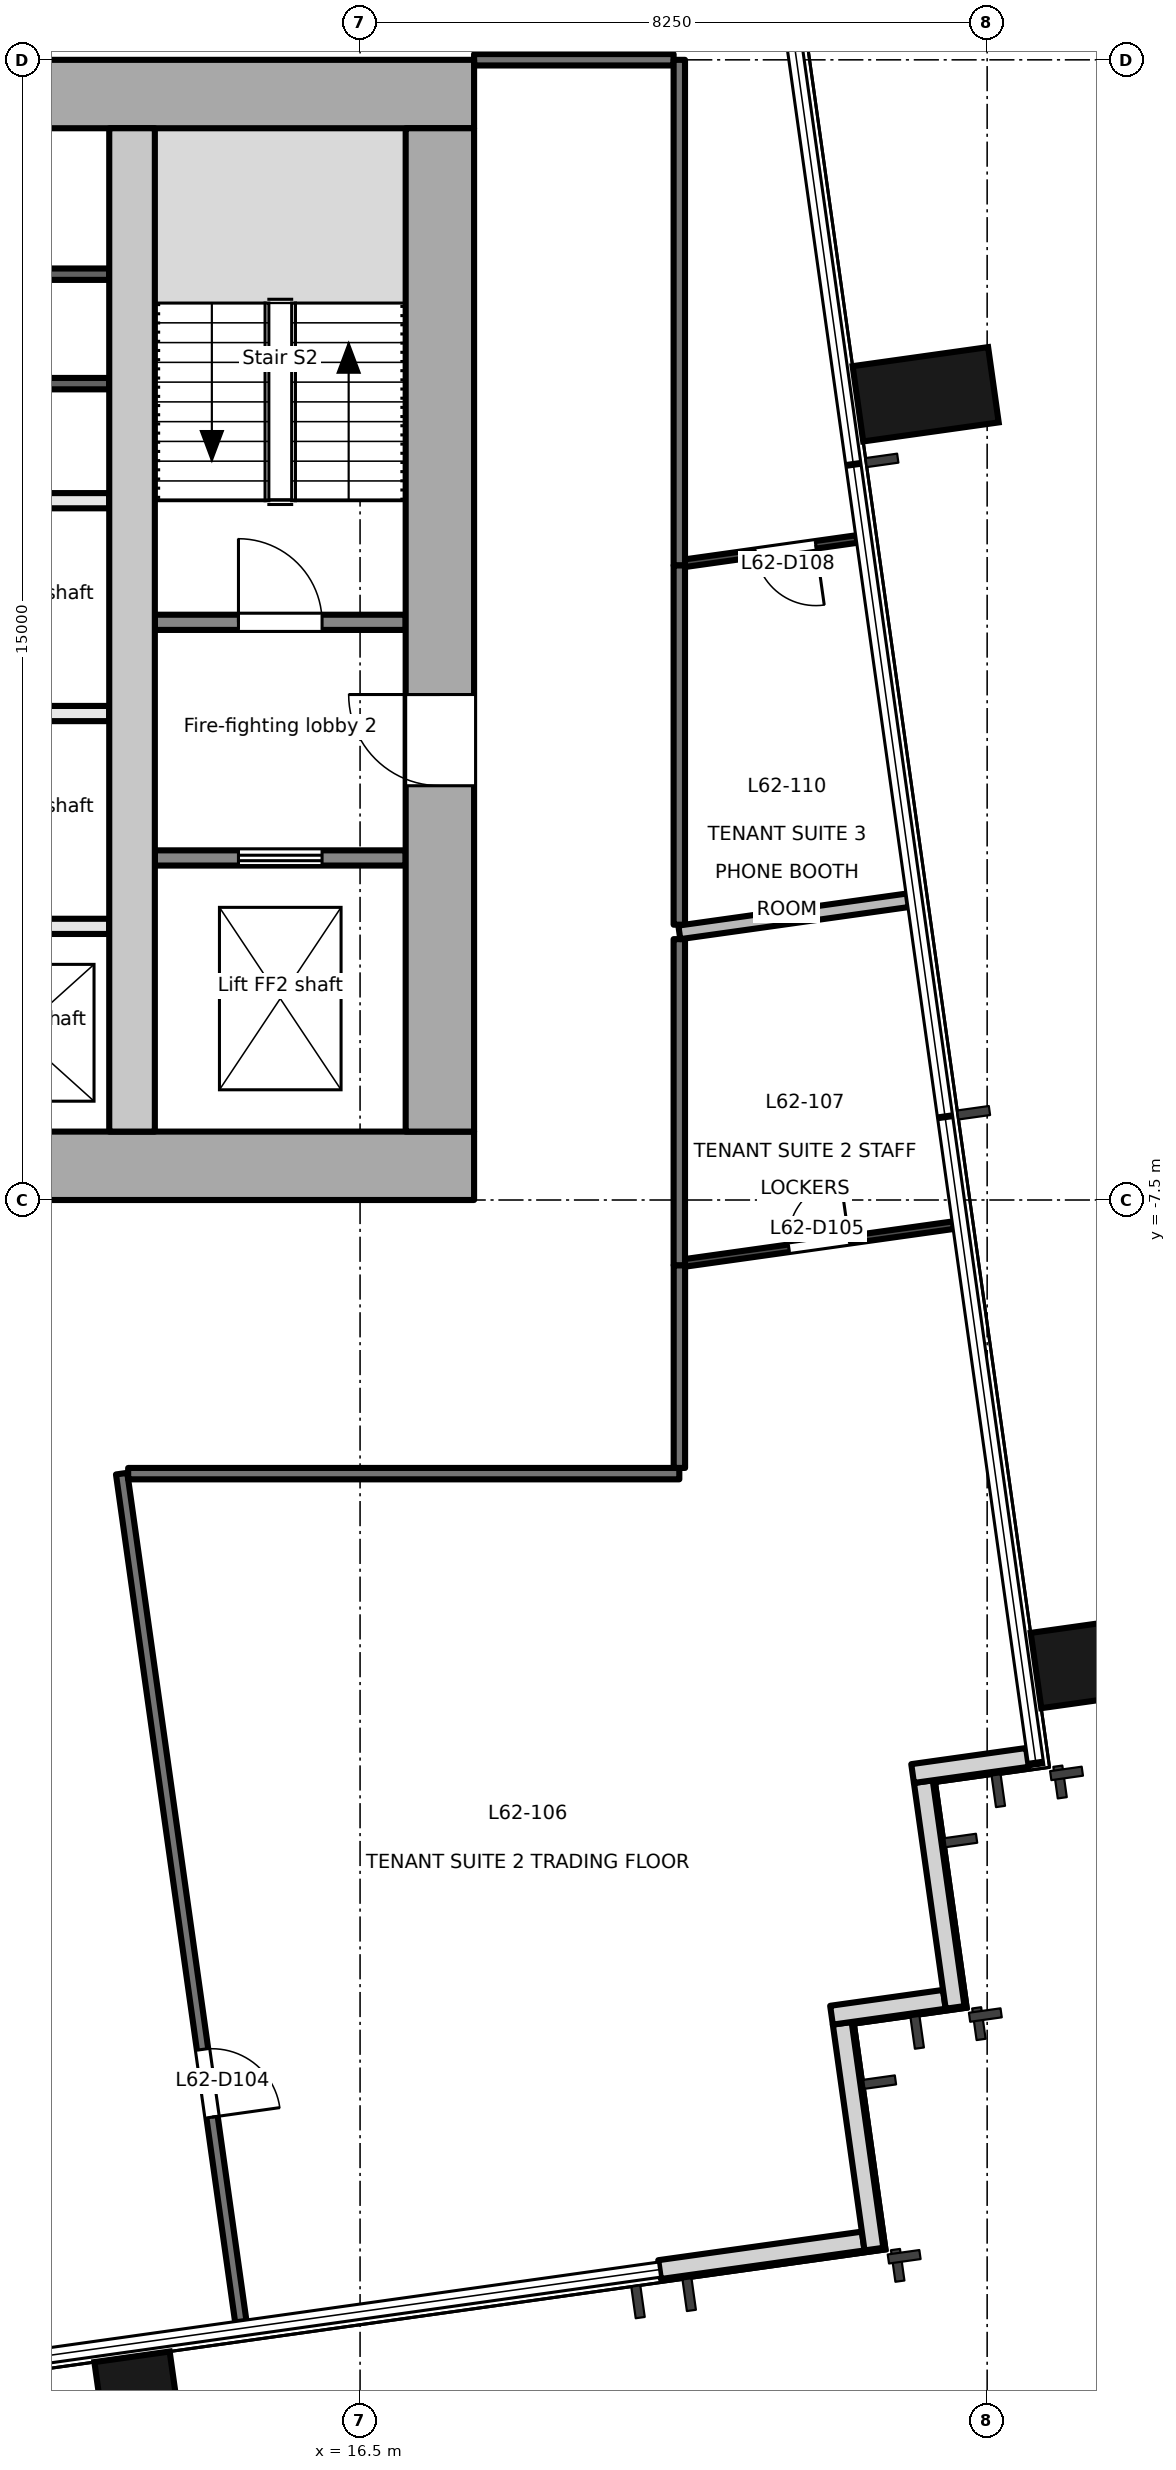
"""IFC4 building model, lengths in metres.
Left out: names, types, materials, properties, quantities, classifications, styles, units other than length and angle.
Written with IfcOpenShell. Run it as: python <this file> out.ifc"""

import sys

from ifc_helpers import new_model, si_unit, direction, frame, frame_2d, origin, origin_2d, place, context, subcontext, project, spatial, rectangle, extrude, element, fill, save


model = new_model("IFC4")
c1 = context("Model", 3, precision=1e-05, world=origin(), true_north=direction((0.0, 1.0)))
c2 = subcontext(c1, "Body", "Model", "MODEL_VIEW")
j1 = project(units=[si_unit("LENGTHUNIT", "METRE"), si_unit("PLANEANGLEUNIT", "RADIAN")], contexts=[c1])
p1 = place(None, origin())
s1 = spatial("IfcSite", under=j1, at=p1, CompositionType="ELEMENT")
p2 = place(p1, origin())
s2 = spatial("IfcBuilding", under=s1, at=p2, CompositionType="ELEMENT")
p3 = place(p2, frame((0.0, 0.0, 270.7)))
s3 = spatial("IfcBuildingStorey", under=s2, at=p3, CompositionType="ELEMENT", Elevation=270.7)
for number, where, z_axis, x_axis in (
    (1, (13.625, -23.61, -0.2), (0.0, 0.0, 1.0), (0.99, 0.139, 0.0)),
    (2, (26.284, -13.565, -0.2), (0.0, 0.0, 1.0), (-0.139, 0.99, 0.0)),
    (3, (23.941, 3.1, -0.2), (0.0, 0.0, 1.0), (-0.139, 0.99, 0.0)),
):
    element("IfcColumn", number, at=place(p3, frame(where, z_axis=z_axis, x_axis=x_axis)), inside=s3, PredefinedType="COLUMN", context=c2, shape_type="SweptSolid", body=[
        extrude(rectangle(XDim=1.0, YDim=1.8, at=origin_2d()), origin(), (0.0, 0.0, 1.0), 3.9),
    ])
p4 = place(p3, frame((20.44, -21.572, 0.0), z_axis=(0.0, 0.0, 1.0), x_axis=(0.990293105353, 0.138994839796, 0.0)))
e4 = element("IfcWall", 4, at=p4, inside=s3, PredefinedType="SOLIDWALL", context=c2, shape_type="SweptSolid", body=[
    extrude(rectangle(XDim=2.705, YDim=0.25, at=frame_2d((1.353, 0.0))), origin(), (0.0, 0.0, 1.0), 3.7),
])
p5 = place(p3, frame((23.26, -21.302, 0.0), z_axis=(0.0, 0.0, 1.0), x_axis=(-0.138994228812, 0.990293191109, 0.0)))
e5 = element("IfcWall", 5, at=p5, inside=s3, PredefinedType="SOLIDWALL", context=c2, shape_type="SweptSolid", body=[
    extrude(rectangle(XDim=3.0, YDim=0.25, at=frame_2d((1.5, 0.0))), origin(), (0.0, 0.0, 1.0), 3.7),
])
p6 = place(p3, frame((22.702, -18.225, 0.0), z_axis=(0.0, 0.0, 1.0), x_axis=(0.990243596651, 0.13934711799, 0.0)))
e6 = element("IfcWall", 6, at=p6, inside=s3, PredefinedType="SOLIDWALL", context=c2, shape_type="SweptSolid", body=[
    extrude(rectangle(XDim=1.5, YDim=0.25, at=frame_2d((0.75, 0.0))), origin(), (0.0, 0.0, 1.0), 3.7),
])
p7 = place(p3, frame((24.328, -18.122, 0.0), z_axis=(0.0, 0.0, 1.0), x_axis=(-0.139358350296, 0.990242015975, 0.0)))
e7 = element("IfcWall", 7, at=p7, inside=s3, PredefinedType="SOLIDWALL", context=c2, shape_type="SweptSolid", body=[
    extrude(rectangle(XDim=2.999, YDim=0.25, at=frame_2d((1.5, 0.0))), origin(), (0.0, 0.0, 1.0), 3.7),
])
p8 = place(p3, frame((23.769, -15.046, 0.0), z_axis=(0.0, 0.0, 1.0), x_axis=(0.990260716096, 0.139225407725, 0.0)))
e8 = element("IfcWall", 8, at=p8, inside=s3, PredefinedType="SOLIDWALL", context=c2, shape_type="SweptSolid", body=[
    extrude(rectangle(XDim=1.526, YDim=0.25, at=frame_2d((0.763, 0.0))), origin(), (0.0, 0.0, 1.0), 3.7),
])
p9 = place(p3, frame((-18.0, -7.05, -0.2), z_axis=(0.0, 0.0, 1.0), x_axis=(1.0, 0.0, 0.0)))
e9 = element("IfcWall", 9, at=p9, inside=s3, PredefinedType="SHEAR", context=c2, shape_type="SweptSolid", body=[
    extrude(rectangle(XDim=36.0, YDim=0.9, at=frame_2d((18.0, 0.0))), origin(), (0.0, 0.0, 1.0), 3.9),
])
p10 = place(p9, frame((11.3, 0.0, 0.2)))
e10 = element("IfcOpeningElement", 10, at=p10, cuts=e9, PredefinedType="OPENING", context=c2, shape_type="SweptSolid", body=[
    extrude(rectangle(XDim=1.8, YDim=2.1, at=frame_2d((0.9, 1.05))), frame((0.0, 0.46, 0.0), z_axis=(0.0, -1.0, 0.0), x_axis=(1.0, 0.0, 0.0)), (0.0, 0.0, 1.0), 0.921),
])
p11 = place(p9, frame((16.8, 0.0, 0.2)))
e11 = element("IfcOpeningElement", 11, at=p11, cuts=e9, PredefinedType="OPENING", context=c2, shape_type="SweptSolid", body=[
    extrude(rectangle(XDim=2.4, YDim=2.1, at=frame_2d((1.2, 1.05))), frame((0.0, 0.46, 0.0), z_axis=(0.0, -1.0, 0.0), x_axis=(1.0, 0.0, 0.0)), (0.0, 0.0, 1.0), 0.921),
])
p12 = place(p9, frame((26.1, 0.0, 0.2)))
e12 = element("IfcOpeningElement", 12, at=p12, cuts=e9, PredefinedType="OPENING", context=c2, shape_type="SweptSolid", body=[
    extrude(rectangle(XDim=2.4, YDim=2.1, at=frame_2d((1.2, 1.05))), frame((0.0, 0.46, 0.0), z_axis=(0.0, -1.0, 0.0), x_axis=(1.0, 0.0, 0.0)), (0.0, 0.0, 1.0), 0.921),
])
p13 = place(p3, frame((-18.0, 7.05, -0.2), z_axis=(0.0, 0.0, 1.0), x_axis=(1.0, 0.0, 0.0)))
e13 = element("IfcWall", 13, at=p13, inside=s3, PredefinedType="SHEAR", context=c2, shape_type="SweptSolid", body=[
    extrude(rectangle(XDim=36.0, YDim=0.9, at=frame_2d((18.0, 0.0))), origin(), (0.0, 0.0, 1.0), 3.9),
])
p14 = place(p3, frame((17.55, -6.6, -0.2), z_axis=(0.0, 0.0, 1.0), x_axis=(0.0, 1.0, 0.0)))
e14 = element("IfcWall", 14, at=p14, inside=s3, PredefinedType="SHEAR", context=c2, shape_type="SweptSolid", body=[
    extrude(rectangle(XDim=13.2, YDim=0.9, at=frame_2d((6.6, 0.0))), origin(), (0.0, 0.0, 1.0), 3.9),
])
p15 = place(p14, frame((4.55, 0.0, 0.2)))
e15 = element("IfcOpeningElement", 15, at=p15, cuts=e14, PredefinedType="OPENING", context=c2, shape_type="SweptSolid", body=[
    extrude(rectangle(XDim=1.2, YDim=2.1, at=frame_2d((0.6, 1.05))), frame((0.0, 0.46, 0.0), z_axis=(0.0, -1.0, 0.0), x_axis=(1.0, 0.0, 0.0)), (0.0, 0.0, 1.0), 0.921),
])
p16 = place(p3, frame((13.5, -6.6, -0.2), z_axis=(0.0, 0.0, 1.0), x_axis=(0.0, 1.0, 0.0)))
e16 = element("IfcWall", 16, at=p16, inside=s3, PredefinedType="SHEAR", context=c2, shape_type="SweptSolid", body=[
    extrude(rectangle(XDim=13.2, YDim=0.6, at=frame_2d((6.6, 0.0))), origin(), (0.0, 0.0, 1.0), 3.9),
])
p17 = place(p3, frame((13.8, -3.0, 0.0), z_axis=(0.0, 0.0, 1.0), x_axis=(1.0, 0.0, 0.0)))
e17 = element("IfcWall", 17, at=p17, inside=s3, PredefinedType="PARTITIONING", context=c2, shape_type="SweptSolid", body=[
    extrude(rectangle(XDim=3.3, YDim=0.2, at=frame_2d((1.65, 0.0))), origin(), (0.0, 0.0, 1.0), 3.7),
])
p18 = place(p17, frame((1.1, 0.0, 0.0)))
e18 = element("IfcOpeningElement", 18, at=p18, cuts=e17, PredefinedType="OPENING", context=c2, shape_type="SweptSolid", body=[
    extrude(rectangle(XDim=1.1, YDim=2.1, at=frame_2d((0.55, 1.05))), frame((0.0, 0.111, 0.0), z_axis=(0.0, -1.0, 0.0), x_axis=(1.0, 0.0, 0.0)), (0.0, 0.0, 1.0), 0.221),
])
p19 = place(p3, frame((13.8, 0.1, 0.0), z_axis=(0.0, 0.0, 1.0), x_axis=(1.0, 0.0, 0.0)))
e19 = element("IfcWall", 19, at=p19, inside=s3, PredefinedType="PARTITIONING", context=c2, shape_type="SweptSolid", body=[
    extrude(rectangle(XDim=3.3, YDim=0.2, at=frame_2d((1.65, 0.0))), origin(), (0.0, 0.0, 1.0), 3.7),
])
p20 = place(p19, frame((1.1, 0.0, 0.0)))
e20 = element("IfcOpeningElement", 20, at=p20, cuts=e19, PredefinedType="OPENING", context=c2, shape_type="SweptSolid", body=[
    extrude(rectangle(XDim=1.1, YDim=2.1, at=frame_2d((0.55, 1.05))), frame((0.0, 0.111, 0.0), z_axis=(0.0, -1.0, 0.0), x_axis=(1.0, 0.0, 0.0)), (0.0, 0.0, 1.0), 0.221),
])
for number, where, z_axis, x_axis in (
    (21, (10.9, -3.9, 0.0), (0.0, 0.0, 1.0), (1.0, 0.0, 0.0)),
    (22, (10.9, -1.1, 0.0), (0.0, 0.0, 1.0), (1.0, 0.0, 0.0)),
    (23, (10.9, 1.7, 0.0), (0.0, 0.0, 1.0), (1.0, 0.0, 0.0)),
):
    element("IfcWall", number, at=place(p3, frame(where, z_axis=z_axis, x_axis=x_axis)), inside=s3, PredefinedType="PARTITIONING", context=c2, shape_type="SweptSolid", body=[
        extrude(rectangle(XDim=2.3, YDim=0.2, at=frame_2d((1.15, 0.0))), origin(), (0.0, 0.0, 1.0), 3.7),
    ])
for number, where, z_axis, x_axis in (
    (24, (10.9, 3.24, 0.0), (0.0, 0.0, 1.0), (1.0, 0.0, 0.0)),
    (25, (10.9, 4.68, 0.0), (0.0, 0.0, 1.0), (1.0, 0.0, 0.0)),
):
    element("IfcWall", number, at=place(p3, frame(where, z_axis=z_axis, x_axis=x_axis)), inside=s3, PredefinedType="PARTITIONING", context=c2, shape_type="SweptSolid", body=[
        extrude(rectangle(XDim=2.3, YDim=0.15, at=frame_2d((1.15, 0.0))), origin(), (0.0, 0.0, 1.0), 3.7),
    ])
p21 = place(p3, frame((13.363, -11.1, 0.0), z_axis=(0.0, 0.0, 1.0), x_axis=(0.139172815303, -0.990268108888, 0.0)))
e26 = element("IfcWall", 26, at=p21, inside=s3, PredefinedType="PARTITIONING", context=c2, shape_type="SweptSolid", body=[
    extrude(rectangle(XDim=11.266, YDim=0.15, at=frame_2d((5.633, 0.0))), origin(), (0.0, 0.0, 1.0), 3.0),
])
p22 = place(p21, frame((7.649, 0.0, 0.0)))
e27 = element("IfcOpeningElement", 27, at=p22, cuts=e26, PredefinedType="OPENING", context=c2, shape_type="SweptSolid", body=[
    extrude(rectangle(XDim=0.9, YDim=2.1, at=frame_2d((0.45, 1.05))), frame((0.0, 0.085, 0.0), z_axis=(0.0, -1.0, 0.0), x_axis=(1.0, 0.0, 0.0)), (0.0, 0.0, 1.0), 0.171),
])
p23 = place(p3, frame((20.7, -11.1, 0.0), z_axis=(0.0, 0.0, 1.0), x_axis=(-1.0, 0.0, 0.0)))
e28 = element("IfcWall", 28, at=p23, inside=s3, PredefinedType="PARTITIONING", context=c2, shape_type="SweptSolid", body=[
    extrude(rectangle(XDim=7.251, YDim=0.15, at=frame_2d((3.625, 0.0))), origin(), (0.0, 0.0, 1.0), 3.0),
])
p24 = place(p3, frame((20.701, -8.358, 0.0), z_axis=(0.0, 0.0, 1.0), x_axis=(0.0, -1.0, 0.0)))
e29 = element("IfcWall", 29, at=p24, inside=s3, PredefinedType="PARTITIONING", context=c2, shape_type="SweptSolid", body=[
    extrude(rectangle(XDim=2.667, YDim=0.15, at=frame_2d((1.333, 0.0))), origin(), (0.0, 0.0, 1.0), 3.7),
])
p25 = place(p3, frame((20.7, -4.068, 0.0), z_axis=(0.0, 0.0, 1.0), x_axis=(0.0, -1.0, 0.0)))
e30 = element("IfcWall", 30, at=p25, inside=s3, PredefinedType="PARTITIONING", context=c2, shape_type="SweptSolid", body=[
    extrude(rectangle(XDim=4.29, YDim=0.15, at=frame_2d((2.145, 0.0))), origin(), (0.0, 0.0, 1.0), 3.4),
])
p26 = place(p3, frame((18.0, 7.501, 0.0), z_axis=(0.0, 0.0, 1.0), x_axis=(1.0, 0.0, 0.0)))
e31 = element("IfcWall", 31, at=p26, inside=s3, PredefinedType="PARTITIONING", context=c2, shape_type="SweptSolid", body=[
    extrude(rectangle(XDim=2.625, YDim=0.15, at=frame_2d((1.312, 0.0))), origin(), (0.0, 0.0, 1.0), 3.7),
])
p27 = place(p3, frame((20.7, 7.5, 0.0), z_axis=(0.0, 0.0, 1.0), x_axis=(0.0, -1.0, 0.0)))
e32 = element("IfcWall", 32, at=p27, inside=s3, PredefinedType="PARTITIONING", context=c2, shape_type="SweptSolid", body=[
    extrude(rectangle(XDim=6.652, YDim=0.15, at=frame_2d((3.326, 0.0))), origin(), (0.0, 0.0, 1.0), 3.4),
])
p28 = place(p3, frame((20.7, 0.848, 0.0), z_axis=(0.0, 0.0, 1.0), x_axis=(0.0, -1.0, 0.0)))
e33 = element("IfcWall", 33, at=p28, inside=s3, PredefinedType="PARTITIONING", context=c2, shape_type="SweptSolid", body=[
    extrude(rectangle(XDim=4.726, YDim=0.15, at=frame_2d((2.363, 0.0))), origin(), (0.0, 0.0, 1.0), 3.4),
])
p29 = place(p3, frame((20.768, -8.328, 0.0), z_axis=(0.0, 0.0, 1.0), x_axis=(0.990282917859, 0.139067403067, 0.0)))
e34 = element("IfcWall", 34, at=p29, inside=s3, PredefinedType="PARTITIONING", context=c2, shape_type="SweptSolid", body=[
    extrude(rectangle(XDim=3.573, YDim=0.1, at=frame_2d((1.786, 0.0))), origin(), (0.0, 0.0, 1.0), 3.7),
])
p30 = place(p29, frame((1.387, 0.0, 0.0)))
e35 = element("IfcOpeningElement", 35, at=p30, cuts=e34, PredefinedType="OPENING", context=c2, shape_type="SweptSolid", body=[
    extrude(rectangle(XDim=0.8, YDim=2.1, at=frame_2d((0.4, 1.05))), frame((0.0, 0.061, 0.0), z_axis=(0.0, -1.0, 0.0), x_axis=(1.0, 0.0, 0.0)), (0.0, 0.0, 1.0), 0.121),
])
p31 = place(p3, frame((20.7, -3.979, 0.0), z_axis=(0.0, 0.0, 1.0), x_axis=(0.990284458693, 0.139056430527, 0.0)))
e36 = element("IfcWall", 36, at=p31, inside=s3, PredefinedType="PARTITIONING", context=c2, shape_type="SweptSolid", body=[
    extrude(rectangle(XDim=3.036, YDim=0.18, at=frame_2d((1.518, 0.0))), origin(), (0.0, 0.0, 1.0), 3.7),
])
p32 = place(p3, frame((23.037, 1.196, 0.0), z_axis=(0.0, 0.0, 1.0), x_axis=(-0.990256119684, -0.139258096452, 0.0)))
e37 = element("IfcWall", 37, at=p32, inside=s3, PredefinedType="PARTITIONING", context=c2, shape_type="SweptSolid", body=[
    extrude(rectangle(XDim=2.291, YDim=0.1, at=frame_2d((1.146, 0.0))), origin(), (0.0, 0.0, 1.0), 3.7),
])
p33 = place(p32, frame((0.547, 0.0, 0.0)))
e38 = element("IfcOpeningElement", 38, at=p33, cuts=e37, PredefinedType="OPENING", context=c2, shape_type="SweptSolid", body=[
    extrude(rectangle(XDim=0.8, YDim=2.1, at=frame_2d((0.4, 1.05))), frame((0.0, 0.061, 0.0), z_axis=(0.0, -1.0, 0.0), x_axis=(1.0, 0.0, 0.0)), (0.0, 0.0, 1.0), 0.121),
])
p34 = place(p18, origin())
e39 = element("IfcDoor", 39, at=p34, inside=s3, OperationType="DOUBLE_DOOR_SLIDING", PredefinedType="DOOR", context=c2, shape_type="SweptSolid", body=[
    extrude(rectangle(XDim=1.1, YDim=2.1, at=frame_2d((0.55, 1.05))), frame((0.0, 0.025, 0.0), z_axis=(0.0, -1.0, 0.0), x_axis=(1.0, 0.0, 0.0)), (0.0, 0.0, 1.0), 0.05),
])
fill(e18, e39)
p35 = place(p15, origin())
e40 = element("IfcDoor", 40, at=p35, inside=s3, OperationType="SINGLE_SWING_RIGHT", PredefinedType="DOOR", context=c2, shape_type="SweptSolid", body=[
    extrude(rectangle(XDim=1.2, YDim=2.1, at=frame_2d((0.6, 1.05))), frame((0.0, 0.025, 0.0), z_axis=(0.0, -1.0, 0.0), x_axis=(1.0, 0.0, 0.0)), (0.0, 0.0, 1.0), 0.05),
])
fill(e15, e40)
p36 = place(p20, origin())
e41 = element("IfcDoor", 41, at=p36, inside=s3, OperationType="SINGLE_SWING_LEFT", PredefinedType="DOOR", context=c2, shape_type="SweptSolid", body=[
    extrude(rectangle(XDim=1.1, YDim=2.1, at=frame_2d((0.55, 1.05))), frame((0.0, 0.025, 0.0), z_axis=(0.0, -1.0, 0.0), x_axis=(1.0, 0.0, 0.0)), (0.0, 0.0, 1.0), 0.05),
])
fill(e20, e41)
p37 = place(p22, origin())
e42 = element("IfcDoor", 42, at=p37, inside=s3, OperationType="SINGLE_SWING_RIGHT", PredefinedType="DOOR", context=c2, shape_type="SweptSolid", body=[
    extrude(rectangle(XDim=0.9, YDim=2.1, at=frame_2d((0.45, 1.05))), frame((0.0, 0.025, 0.0), z_axis=(0.0, -1.0, 0.0), x_axis=(1.0, 0.0, 0.0)), (0.0, 0.0, 1.0), 0.05),
])
fill(e27, e42)
p38 = place(p30, origin())
e43 = element("IfcDoor", 43, at=p38, inside=s3, OperationType="SINGLE_SWING_RIGHT", PredefinedType="DOOR", context=c2, shape_type="SweptSolid", body=[
    extrude(rectangle(XDim=0.8, YDim=2.1, at=frame_2d((0.4, 1.05))), frame((0.0, 0.025, 0.0), z_axis=(0.0, -1.0, 0.0), x_axis=(1.0, 0.0, 0.0)), (0.0, 0.0, 1.0), 0.05),
])
fill(e35, e43)
p39 = place(p33, origin())
e44 = element("IfcDoor", 44, at=p39, inside=s3, OperationType="SINGLE_SWING_LEFT", PredefinedType="DOOR", context=c2, shape_type="SweptSolid", body=[
    extrude(rectangle(XDim=0.8, YDim=2.1, at=frame_2d((0.4, 1.05))), frame((0.0, 0.025, 0.0), z_axis=(0.0, -1.0, 0.0), x_axis=(1.0, 0.0, 0.0)), (0.0, 0.0, 1.0), 0.05),
])
fill(e38, e44)
save(model, sys.argv[1])
